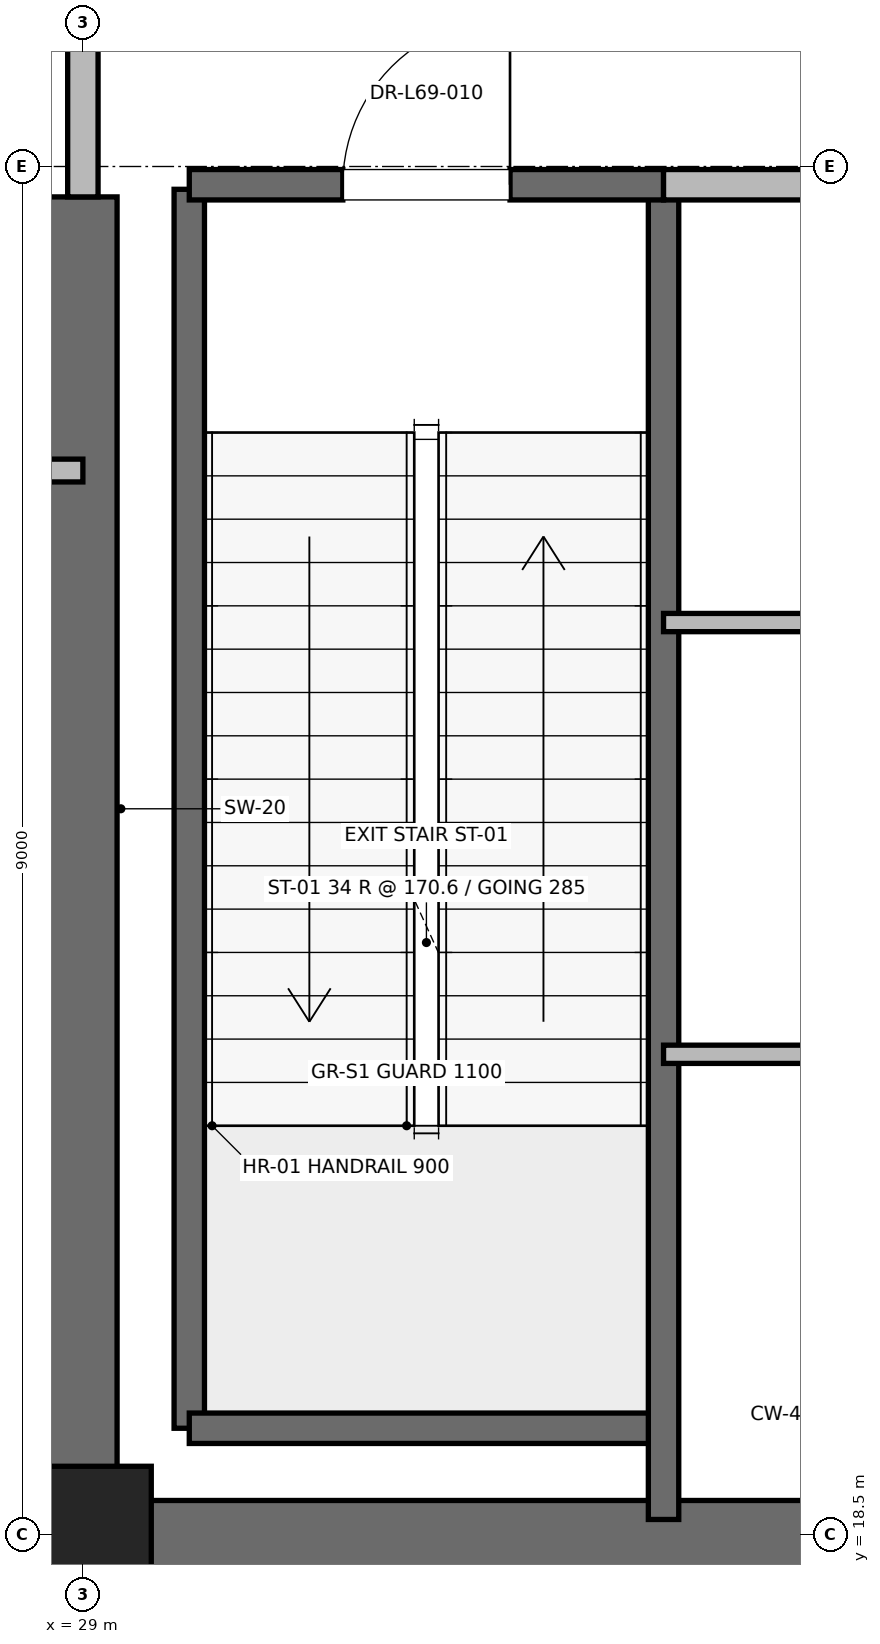
"""IFC4 building model, lengths in metres.
Left out: names, types, materials, properties, quantities, classifications, styles, units other than length and angle.
Written with IfcOpenShell. Run it as: python <this file> out.ifc"""

import sys

from ifc_helpers import new_model, si_unit, direction, frame, frame_2d, origin, origin_2d, place, context, subcontext, project, spatial, rectangle, extrude, element, fill, save


model = new_model("IFC4")
c1 = context("Model", 3, precision=1e-05, world=origin(), true_north=direction((0.0, 1.0)))
c2 = subcontext(c1, "Body", "Model", "MODEL_VIEW")
j1 = project(units=[si_unit("LENGTHUNIT", "METRE"), si_unit("PLANEANGLEUNIT", "RADIAN")], contexts=[c1])
p1 = place(None, origin())
s1 = spatial("IfcSite", under=j1, at=p1, CompositionType="ELEMENT")
p2 = place(p1, origin())
s2 = spatial("IfcBuilding", under=s1, at=p2, CompositionType="ELEMENT")
p3 = place(p2, frame((0.0, 0.0, 295.2)))
s3 = spatial("IfcBuildingStorey", under=s2, at=p3, CompositionType="ELEMENT", Elevation=295.2)
p4 = place(p3, frame((29.0, 18.5, 0.0), z_axis=(0.0, 0.0, 1.0), x_axis=(1.0, 0.0, 0.0)))
e1 = element("IfcColumn", 1, at=p4, inside=s3, PredefinedType="PILASTER", context=c2, shape_type="SweptSolid", body=[
    extrude(rectangle(XDim=0.9, YDim=0.9, at=origin_2d()), origin(), (0.0, 0.0, 1.0), 5.8),
])
p5 = place(p3, frame((29.0, 18.5, 0.0), z_axis=(0.0, 0.0, 1.0), x_axis=(1.0, 0.0, 0.0)))
e2 = element("IfcWall", 2, at=p5, inside=s3, PredefinedType="SHEAR", context=c2, shape_type="SweptSolid", body=[
    extrude(rectangle(XDim=9.2, YDim=0.45, at=frame_2d((4.6, 0.0))), origin(), (0.0, 0.0, 1.0), 5.5),
])
p6 = place(p3, frame((29.0, 18.5, 0.0), z_axis=(0.0, 0.0, 1.0), x_axis=(0.0, 1.0, 0.0)))
e3 = element("IfcWall", 3, at=p6, inside=s3, PredefinedType="SHEAR", context=c2, shape_type="SweptSolid", body=[
    extrude(rectangle(XDim=8.8, YDim=0.45, at=frame_2d((4.4, 0.0))), origin(), (0.0, 0.0, 1.0), 5.5),
])
p7 = place(p3, frame((29.7, 19.2, 0.0), z_axis=(0.0, 0.0, 1.0), x_axis=(0.0, 1.0, 0.0)))
e4 = element("IfcWall", 4, at=p7, inside=s3, PredefinedType="SOLIDWALL", context=c2, shape_type="SweptSolid", body=[
    extrude(rectangle(XDim=8.15, YDim=0.2, at=frame_2d((4.075, 0.0))), origin(), (0.0, 0.0, 1.0), 5.5),
])
p8 = place(p3, frame((29.7, 19.2, 0.0), z_axis=(0.0, 0.0, 1.0), x_axis=(1.0, 0.0, 0.0)))
e5 = element("IfcWall", 5, at=p8, inside=s3, PredefinedType="SOLIDWALL", context=c2, shape_type="SweptSolid", body=[
    extrude(rectangle(XDim=3.12, YDim=0.2, at=frame_2d((1.56, 0.0))), origin(), (0.0, 0.0, 1.0), 5.5),
])
p9 = place(p3, frame((32.82, 18.6, 0.0), z_axis=(0.0, 0.0, 1.0), x_axis=(0.0, 1.0, 0.0)))
e6 = element("IfcWall", 6, at=p9, inside=s3, PredefinedType="SOLIDWALL", context=c2, shape_type="SweptSolid", body=[
    extrude(rectangle(XDim=8.78, YDim=0.2, at=frame_2d((4.39, 0.0))), origin(), (0.0, 0.0, 1.0), 5.5),
])
p10 = place(p3, frame((29.7, 27.38, 0.0), z_axis=(0.0, 0.0, 1.0), x_axis=(1.0, 0.0, 0.0)))
e7 = element("IfcWall", 7, at=p10, inside=s3, PredefinedType="SOLIDWALL", context=c2, shape_type="SweptSolid", body=[
    extrude(rectangle(XDim=3.12, YDim=0.2, at=frame_2d((1.56, 0.0))), origin(), (0.0, 0.0, 1.0), 5.5),
])
p11 = place(p10, frame((1.01, 0.0, 0.0)))
e8 = element("IfcOpeningElement", 8, at=p11, cuts=e7, PredefinedType="OPENING", context=c2, shape_type="SweptSolid", body=[
    extrude(rectangle(XDim=1.1, YDim=2.15, at=frame_2d((0.55, 1.075))), frame((0.0, 0.1, 0.0), z_axis=(0.0, -1.0, 0.0), x_axis=(1.0, 0.0, 0.0)), (0.0, 0.0, 1.0), 0.2),
])
p12 = place(p3, frame((29.0, 27.3, 0.0), z_axis=(0.0, 0.0, 1.0), x_axis=(0.0, 1.0, 0.0)))
e9 = element("IfcWall", 9, at=p12, inside=s3, PredefinedType="PARTITIONING", context=c2, shape_type="SweptSolid", body=[
    extrude(rectangle(XDim=3.4, YDim=0.2, at=frame_2d((1.7, 0.0))), origin(), (0.0, 0.0, 1.0), 4.58),
])
p13 = place(p12, frame((1.125, 0.0, 0.0)))
e10 = element("IfcOpeningElement", 10, at=p13, cuts=e9, PredefinedType="OPENING", context=c2, shape_type="SweptSolid", body=[
    extrude(rectangle(XDim=1.15, YDim=2.2, at=frame_2d((0.575, 1.1))), frame((0.0, 0.1, 0.0), z_axis=(0.0, -1.0, 0.0), x_axis=(1.0, 0.0, 0.0)), (0.0, 0.0, 1.0), 0.2),
])
p14 = place(p3, frame((32.82, 27.38, 0.0), z_axis=(0.0, 0.0, 1.0), x_axis=(1.0, 0.0, 0.0)))
e11 = element("IfcWall", 11, at=p14, inside=s3, PredefinedType="PARTITIONING", context=c2, shape_type="SweptSolid", body=[
    extrude(rectangle(XDim=5.62, YDim=0.2, at=frame_2d((2.81, 0.0))), origin(), (0.0, 0.0, 1.0), 5.5),
])
for number, where, z_axis, x_axis in (
    (12, (32.82, 21.66, 0.0), (0.0, 0.0, 1.0), (1.0, 0.0, 0.0)),
    (13, (32.82, 24.5, 0.0), (0.0, 0.0, 1.0), (1.0, 0.0, 0.0)),
):
    element("IfcWall", number, at=place(p3, frame(where, z_axis=z_axis, x_axis=x_axis)), inside=s3, PredefinedType="PARTITIONING", context=c2, shape_type="SweptSolid", body=[
        extrude(rectangle(XDim=5.23, YDim=0.12, at=frame_2d((2.615, 0.0))), origin(), (0.0, 0.0, 1.0), 2.85),
    ])
p15 = place(p3, frame((26.0, 25.5, 0.0), z_axis=(0.0, 0.0, 1.0), x_axis=(1.0, 0.0, 0.0)))
e14 = element("IfcWall", 14, at=p15, inside=s3, PredefinedType="PARTITIONING", context=c2, shape_type="SweptSolid", body=[
    extrude(rectangle(XDim=3.0, YDim=0.15, at=frame_2d((1.5, 0.0))), origin(), (0.0, 0.0, 1.0), 2.85),
])
p16 = place(p15, frame((1.025, 0.0, 0.0)))
e15 = element("IfcOpeningElement", 15, at=p16, cuts=e14, PredefinedType="OPENING", context=c2, shape_type="SweptSolid", body=[
    extrude(rectangle(XDim=0.95, YDim=2.15, at=frame_2d((0.475, 1.075))), frame((0.0, 0.075, 0.0), z_axis=(0.0, -1.0, 0.0), x_axis=(1.0, 0.0, 0.0)), (0.0, 0.0, 1.0), 0.15),
])
p17 = place(p11, origin())
e16 = element("IfcDoor", 16, at=p17, inside=s3, OperationType="SINGLE_SWING_RIGHT", PredefinedType="DOOR", context=c2, shape_type="SweptSolid", body=[
    extrude(rectangle(XDim=1.1, YDim=2.15, at=frame_2d((0.55, 1.075))), frame((0.0, 0.025, 0.0), z_axis=(0.0, -1.0, 0.0), x_axis=(1.0, 0.0, 0.0)), (0.0, 0.0, 1.0), 0.05),
])
fill(e8, e16)
save(model, sys.argv[1])
